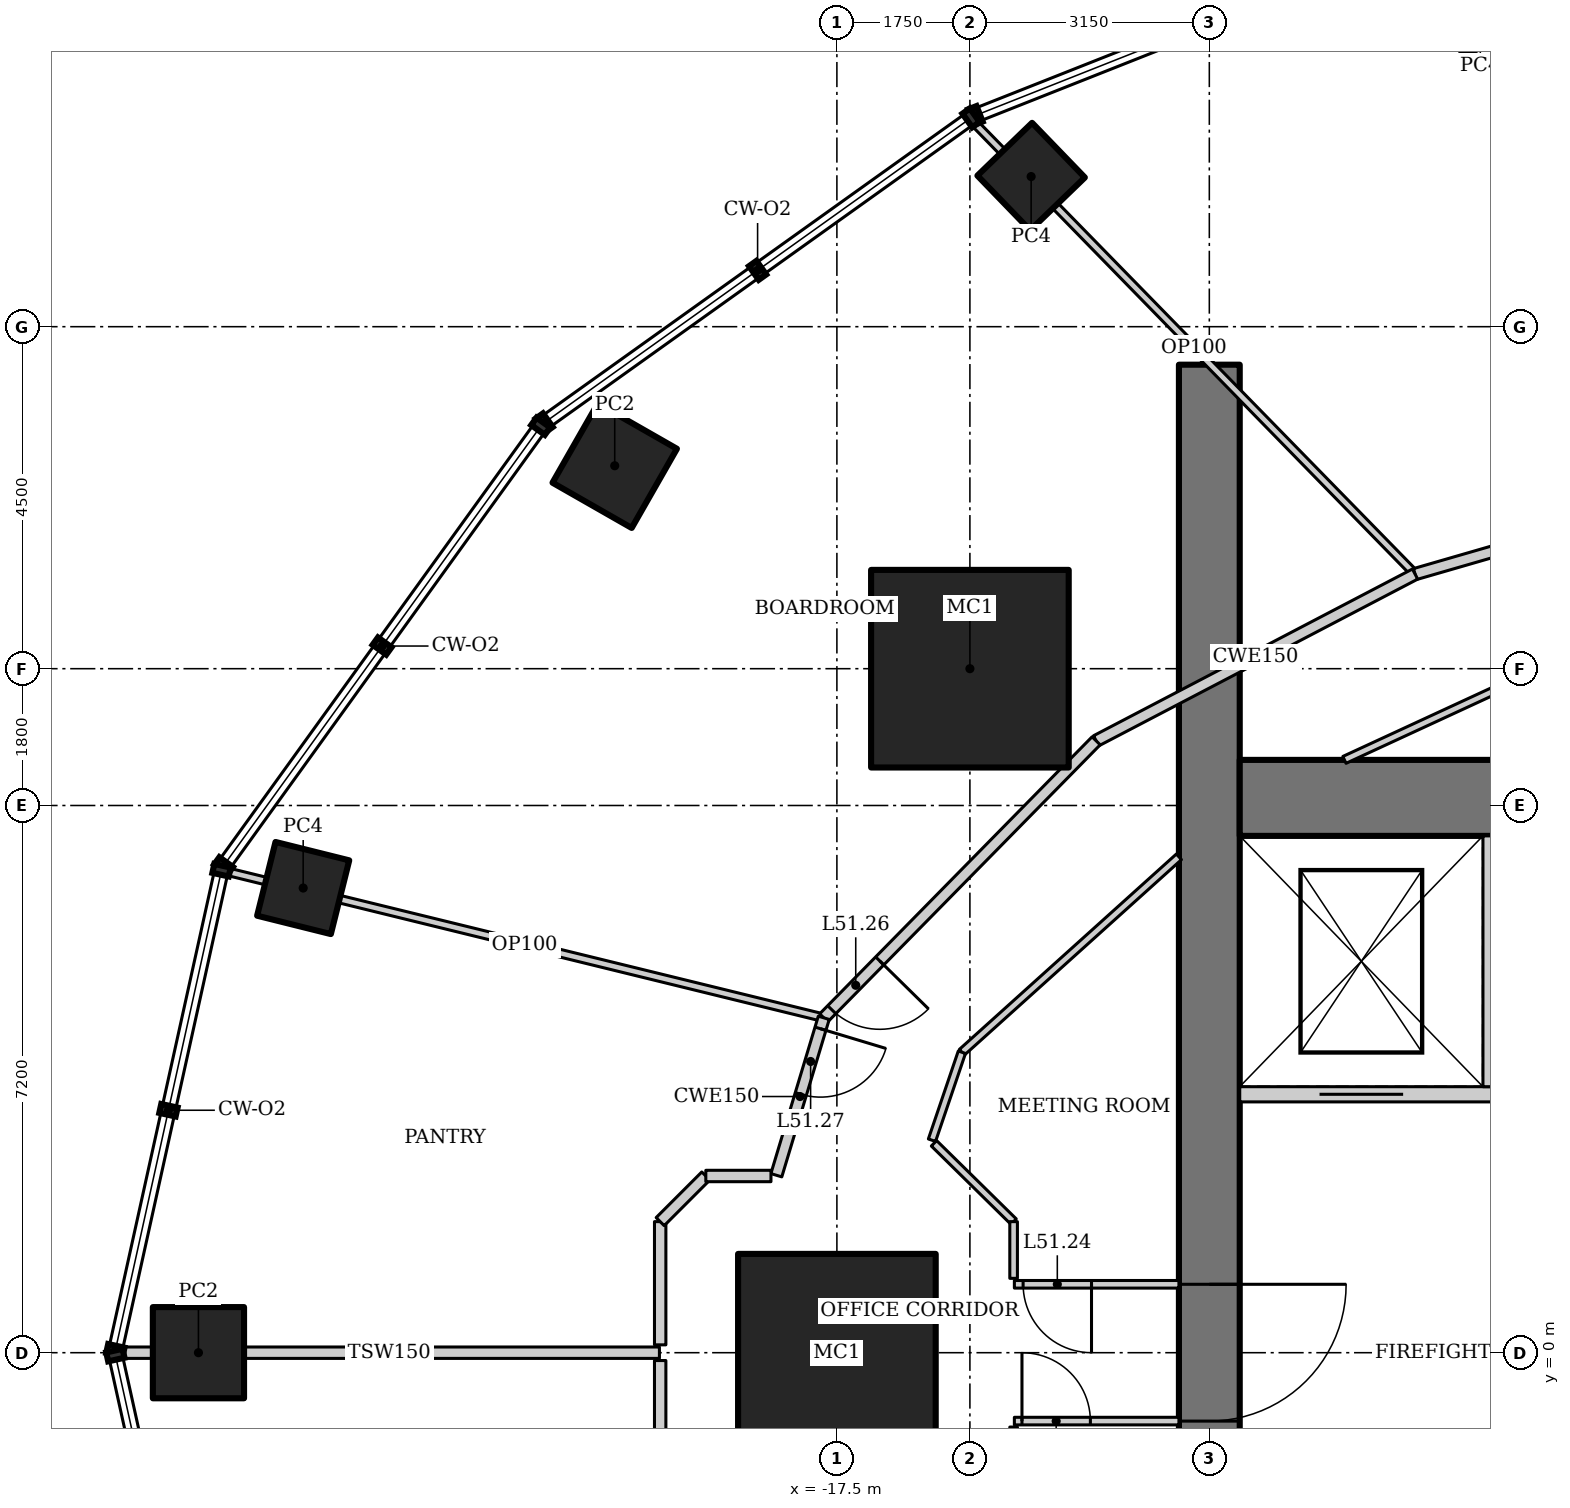
"""IFC4 building model, lengths in metres.
Left out: names, types, materials, properties, quantities, classifications, styles, units other than length and angle.
Written with IfcOpenShell. Run it as: python <this file> out.ifc"""

import sys

from ifc_helpers import new_model, si_unit, direction, frame, frame_2d, origin, origin_2d, place, context, subcontext, project, spatial, rectangle, hollow_rectangle, extrude, element, fill, save


model = new_model("IFC4")
c1 = context("Model", 3, precision=1e-05, world=origin(), true_north=direction((0.0, 1.0)))
c2 = subcontext(c1, "Body", "Model", "MODEL_VIEW")
j1 = project(units=[si_unit("LENGTHUNIT", "METRE"), si_unit("PLANEANGLEUNIT", "RADIAN")], contexts=[c1])
p1 = place(None, origin())
s1 = spatial("IfcSite", under=j1, at=p1, CompositionType="ELEMENT")
p2 = place(p1, origin())
s2 = spatial("IfcBuilding", under=s1, at=p2, CompositionType="ELEMENT")
p3 = place(p2, frame((0.0, 0.0, 220.0)))
s3 = spatial("IfcBuildingStorey", under=s2, at=p3, CompositionType="ELEMENT", Elevation=220.0)
for number, where, z_axis, x_axis in (
    (1, (-15.75, 9.0, 0.0), (0.0, 0.0, 1.0), (1.0, 0.0, 0.0)),
    (2, (-17.5, 0.0, 0.0), (0.0, 0.0, 1.0), (1.0, 0.0, 0.0)),
):
    element("IfcColumn", number, at=place(p3, frame(where, z_axis=z_axis, x_axis=x_axis)), inside=s3, PredefinedType="COLUMN", context=c2, shape_type="SweptSolid", body=[
        extrude(hollow_rectangle(XDim=2.6, YDim=2.6, WallThickness=0.13, at=origin_2d()), origin(), (0.0, 0.0, 1.0), 4.2),
    ])
for number, where, z_axis, x_axis in (
    (3, (-9.035, 17.731, 0.0), (0.0, 0.0, 1.0), (0.891, 0.454, 0.0)),
    (4, (-14.944, 15.475, 0.0), (0.0, 0.0, 1.0), (0.719, 0.695, 0.0)),
):
    element("IfcColumn", number, at=place(p3, frame(where, z_axis=z_axis, x_axis=x_axis)), inside=s3, PredefinedType="COLUMN", context=c2, shape_type="SweptSolid", body=[
        extrude(hollow_rectangle(XDim=1.0, YDim=1.0, WallThickness=0.08, at=origin_2d()), origin(), (0.0, 0.0, 1.0), 4.2),
    ])
p4 = place(p3, frame((-20.423, 11.67, 0.0), z_axis=(0.0, 0.0, 1.0), x_axis=(0.496139221777, 0.86824298017, 0.0)))
e5 = element("IfcColumn", 5, at=p4, inside=s3, PredefinedType="COLUMN", context=c2, shape_type="SweptSolid", body=[
    extrude(hollow_rectangle(XDim=1.2, YDim=1.2, WallThickness=0.1, at=origin_2d()), origin(), (0.0, 0.0, 1.0), 4.2),
])
p5 = place(p3, frame((-24.522, 6.114, 0.0), z_axis=(0.0, 0.0, 1.0), x_axis=(0.2419218956, 0.970295726276, 0.0)))
e6 = element("IfcColumn", 6, at=p5, inside=s3, PredefinedType="COLUMN", context=c2, shape_type="SweptSolid", body=[
    extrude(hollow_rectangle(XDim=1.0, YDim=1.0, WallThickness=0.08, at=origin_2d()), origin(), (0.0, 0.0, 1.0), 4.2),
])
p6 = place(p3, frame((-25.9, 0.0, 0.0), z_axis=(0.0, 0.0, 1.0), x_axis=(1.0, 0.0, 0.0)))
e7 = element("IfcColumn", 7, at=p6, inside=s3, PredefinedType="COLUMN", context=c2, shape_type="SweptSolid", body=[
    extrude(hollow_rectangle(XDim=1.2, YDim=1.2, WallThickness=0.1, at=origin_2d()), origin(), (0.0, 0.0, 1.0), 4.2),
])
p7 = place(p3, frame((-12.6, 13.0, 0.0), z_axis=(0.0, 0.0, 1.0), x_axis=(0.0, -1.0, 0.0)))
e8 = element("IfcWall", 8, at=p7, inside=s3, PredefinedType="SHEAR", context=c2, shape_type="SweptSolid", body=[
    extrude(rectangle(XDim=26.0, YDim=0.8, at=frame_2d((13.0, 0.0))), origin(), (0.0, 0.0, 1.0), 4.2),
])
p8 = place(p7, frame((12.1, 0.0, 0.0)))
e9 = element("IfcOpeningElement", 9, at=p8, cuts=e8, PredefinedType="OPENING", context=c2, shape_type="SweptSolid", body=[
    extrude(rectangle(XDim=1.8, YDim=2.1, at=frame_2d((0.9, 1.05))), frame((0.0, 0.41, 0.0), z_axis=(0.0, -1.0, 0.0), x_axis=(1.0, 0.0, 0.0)), (0.0, 0.0, 1.0), 0.82),
])
p9 = place(p3, frame((-5.6, 7.3, 0.0), z_axis=(0.0, 0.0, 1.0), x_axis=(-1.0, 0.0, 0.0)))
e10 = element("IfcWall", 10, at=p9, inside=s3, PredefinedType="SHEAR", context=c2, shape_type="SweptSolid", body=[
    extrude(rectangle(XDim=6.6, YDim=1.0, at=frame_2d((3.3, 0.0))), origin(), (0.0, 0.0, 1.0), 4.2),
])
p10 = place(p3, frame((-12.2, 3.4, 0.0), z_axis=(0.0, 0.0, 1.0), x_axis=(1.0, 0.0, 0.0)))
e11 = element("IfcWall", 11, at=p10, inside=s3, PredefinedType="SOLIDWALL", context=c2, shape_type="SweptSolid", body=[
    extrude(rectangle(XDim=6.6, YDim=0.2, at=frame_2d((3.3, 0.0))), origin(), (0.0, 0.0, 1.0), 4.2),
])
p11 = place(p10, frame((1.05, 0.0, 0.0)))
e12 = element("IfcOpeningElement", 12, at=p11, cuts=e11, PredefinedType="OPENING", context=c2, shape_type="SweptSolid", body=[
    extrude(rectangle(XDim=1.1, YDim=2.2, at=frame_2d((0.55, 1.1))), frame((0.0, 0.11, 0.0), z_axis=(0.0, -1.0, 0.0), x_axis=(1.0, 0.0, 0.0)), (0.0, 0.0, 1.0), 0.22),
])
p12 = place(p10, frame((4.3, 0.0, 0.0)))
e13 = element("IfcOpeningElement", 13, at=p12, cuts=e11, PredefinedType="OPENING", context=c2, shape_type="SweptSolid", body=[
    extrude(rectangle(XDim=1.4, YDim=2.2, at=frame_2d((0.7, 1.1))), frame((0.0, 0.11, 0.0), z_axis=(0.0, -1.0, 0.0), x_axis=(1.0, 0.0, 0.0)), (0.0, 0.0, 1.0), 0.22),
])
p13 = place(p3, frame((-8.9, 3.5, 0.0), z_axis=(0.0, 0.0, 1.0), x_axis=(0.0, 1.0, 0.0)))
e14 = element("IfcWall", 14, at=p13, inside=s3, PredefinedType="SOLIDWALL", context=c2, shape_type="SweptSolid", body=[
    extrude(rectangle(XDim=3.3, YDim=0.2, at=frame_2d((1.65, 0.0))), origin(), (0.0, 0.0, 1.0), 4.2),
])
p14 = place(p3, frame((-15.709, 16.199, 0.0), z_axis=(0.0, 0.0, 1.0), x_axis=(0.69875697861, -0.715359129978, 0.0)))
e15 = element("IfcWall", 15, at=p14, inside=s3, PredefinedType="PARTITIONING", context=c2, shape_type="SweptSolid", body=[
    extrude(rectangle(XDim=8.323, YDim=0.1, at=frame_2d((4.162, 0.0))), origin(), (0.0, 0.0, 1.0), 3.41),
])
p15 = place(p3, frame((-25.543, 6.336, 0.0), z_axis=(0.0, 0.0, 1.0), x_axis=(0.97123661777, -0.238116425942, 0.0)))
e16 = element("IfcWall", 16, at=p15, inside=s3, PredefinedType="PARTITIONING", context=c2, shape_type="SweptSolid", body=[
    extrude(rectangle(XDim=8.103, YDim=0.1, at=frame_2d((4.052, 0.0))), origin(), (0.0, 0.0, 1.0), 3.108),
])
p16 = place(p3, frame((-5.82, 11.423, 0.0), z_axis=(0.0, 0.0, 1.0), x_axis=(-0.960614838378, -0.27788330696, 0.0)))
e17 = element("IfcWall", 17, at=p16, inside=s3, PredefinedType="PARTITIONING", context=c2, shape_type="SweptSolid", body=[
    extrude(rectangle(XDim=4.24, YDim=0.15, at=frame_2d((2.12, 0.0))), origin(), (0.0, 0.0, 1.0), 4.05),
])
p17 = place(p3, frame((-9.893, 10.245, 0.0), z_axis=(0.0, 0.0, 1.0), x_axis=(-0.886174439647, -0.463351769735, 0.0)))
e18 = element("IfcWall", 18, at=p17, inside=s3, PredefinedType="PARTITIONING", context=c2, shape_type="SweptSolid", body=[
    extrude(rectangle(XDim=4.735, YDim=0.15, at=frame_2d((2.367, 0.0))), origin(), (0.0, 0.0, 1.0), 4.05),
])
p18 = place(p3, frame((-14.089, 8.051, 0.0), z_axis=(0.0, 0.0, 1.0), x_axis=(-0.701111216625, -0.713051934941, 0.0)))
e19 = element("IfcWall", 19, at=p18, inside=s3, PredefinedType="PARTITIONING", context=c2, shape_type="SweptSolid", body=[
    extrude(rectangle(XDim=5.112, YDim=0.15, at=frame_2d((2.556, 0.0))), origin(), (0.0, 0.0, 1.0), 4.05),
])
p19 = place(p18, frame((4.061, 0.0, 0.0)))
e20 = element("IfcOpeningElement", 20, at=p19, cuts=e19, PredefinedType="OPENING", context=c2, shape_type="SweptSolid", body=[
    extrude(rectangle(XDim=0.9, YDim=2.1, at=frame_2d((0.45, 1.05))), frame((0.0, 0.085, 0.0), z_axis=(0.0, -1.0, 0.0), x_axis=(1.0, 0.0, 0.0)), (0.0, 0.0, 1.0), 0.17),
])
p20 = place(p3, frame((-10.823, 7.8, 0.0), z_axis=(0.0, 0.0, 1.0), x_axis=(0.907759689292, 0.419490579748, 0.0)))
e21 = element("IfcWall", 21, at=p20, inside=s3, PredefinedType="PARTITIONING", context=c2, shape_type="SweptSolid", body=[
    extrude(rectangle(XDim=2.506, YDim=0.1, at=frame_2d((1.253, 0.0))), origin(), (0.0, 0.0, 1.0), 4.05),
])
p21 = place(p3, frame((-15.856, 3.953, 0.0), z_axis=(0.0, 0.0, 1.0), x_axis=(0.743177243228, 0.669094601046, 0.0)))
e22 = element("IfcWall", 22, at=p21, inside=s3, PredefinedType="PARTITIONING", context=c2, shape_type="SweptSolid", body=[
    extrude(rectangle(XDim=3.843, YDim=0.1, at=frame_2d((1.921, 0.0))), origin(), (0.0, 0.0, 1.0), 4.05),
])
p22 = place(p3, frame((-26.944, 0.0, 0.0), z_axis=(0.0, 0.0, 1.0), x_axis=(1.0, 0.0, 0.0)))
e23 = element("IfcWall", 23, at=p22, inside=s3, PredefinedType="PARTITIONING", context=c2, shape_type="SweptSolid", body=[
    extrude(rectangle(XDim=7.109, YDim=0.15, at=frame_2d((3.555, 0.0))), origin(), (0.0, 0.0, 1.0), 3.349),
])
p23 = place(p3, frame((-17.673, 4.406, 0.0), z_axis=(0.0, 0.0, 1.0), x_axis=(-0.288362447016, -0.957521330912, 0.0)))
e24 = element("IfcWall", 24, at=p23, inside=s3, PredefinedType="PARTITIONING", context=c2, shape_type="SweptSolid", body=[
    extrude(rectangle(XDim=2.163, YDim=0.15, at=frame_2d((1.082, 0.0))), origin(), (0.0, 0.0, 1.0), 4.05),
])
p24 = place(p23, frame((0.15, 0.0, 0.0)))
e25 = element("IfcOpeningElement", 25, at=p24, cuts=e24, PredefinedType="OPENING", context=c2, shape_type="SweptSolid", body=[
    extrude(rectangle(XDim=0.9, YDim=2.1, at=frame_2d((0.45, 1.05))), frame((0.0, 0.085, 0.0), z_axis=(0.0, -1.0, 0.0), x_axis=(1.0, 0.0, 0.0)), (0.0, 0.0, 1.0), 0.17),
])
p25 = place(p3, frame((-15.165, -0.9, 0.0), z_axis=(0.0, 0.0, 1.0), x_axis=(1.0, 0.0, 0.0)))
e26 = element("IfcWall", 26, at=p25, inside=s3, PredefinedType="PARTITIONING", context=c2, shape_type="SweptSolid", body=[
    extrude(rectangle(XDim=2.165, YDim=0.1, at=frame_2d((1.083, 0.0))), origin(), (0.0, 0.0, 1.0), 4.05),
])
p26 = place(p25, frame((0.1, 0.0, 0.0)))
e27 = element("IfcOpeningElement", 27, at=p26, cuts=e26, PredefinedType="OPENING", context=c2, shape_type="SweptSolid", body=[
    extrude(rectangle(XDim=0.9, YDim=2.1, at=frame_2d((0.45, 1.05))), frame((0.0, 0.06, 0.0), z_axis=(0.0, -1.0, 0.0), x_axis=(1.0, 0.0, 0.0)), (0.0, 0.0, 1.0), 0.12),
])
p27 = place(p3, frame((-13.0, 0.9, 0.0), z_axis=(0.0, 0.0, 1.0), x_axis=(-1.0, 0.0, 0.0)))
e28 = element("IfcWall", 28, at=p27, inside=s3, PredefinedType="PARTITIONING", context=c2, shape_type="SweptSolid", body=[
    extrude(rectangle(XDim=2.165, YDim=0.1, at=frame_2d((1.083, 0.0))), origin(), (0.0, 0.0, 1.0), 4.05),
])
p28 = place(p27, frame((1.15, 0.0, 0.0)))
e29 = element("IfcOpeningElement", 29, at=p28, cuts=e28, PredefinedType="OPENING", context=c2, shape_type="SweptSolid", body=[
    extrude(rectangle(XDim=0.9, YDim=2.1, at=frame_2d((0.45, 1.05))), frame((0.0, 0.06, 0.0), z_axis=(0.0, -1.0, 0.0), x_axis=(1.0, 0.0, 0.0)), (0.0, 0.0, 1.0), 0.12),
])
p29 = place(p3, frame((-16.249, 2.796, 0.0), z_axis=(0.0, 0.0, 1.0), x_axis=(0.321913473529, 0.946769093053, 0.0)))
e30 = element("IfcWall", 30, at=p29, inside=s3, PredefinedType="PARTITIONING", context=c2, shape_type="SweptSolid", body=[
    extrude(rectangle(XDim=1.223, YDim=0.1, at=frame_2d((0.611, 0.0))), origin(), (0.0, 0.0, 1.0), 4.05),
])
p30 = place(p3, frame((-15.175, -0.978, 0.0), z_axis=(0.0, 0.0, 1.0), x_axis=(0.0, -1.0, 0.0)))
e31 = element("IfcWall", 31, at=p30, inside=s3, PredefinedType="PARTITIONING", context=c2, shape_type="SweptSolid", body=[
    extrude(rectangle(XDim=0.746, YDim=0.1, at=frame_2d((0.373, 0.0))), origin(), (0.0, 0.0, 1.0), 4.05),
])
p31 = place(p3, frame((-16.223, 2.755, 0.0), z_axis=(0.0, 0.0, 1.0), x_axis=(0.712897698193, -0.701268045694, 0.0)))
e32 = element("IfcWall", 32, at=p31, inside=s3, PredefinedType="PARTITIONING", context=c2, shape_type="SweptSolid", body=[
    extrude(rectangle(XDim=1.469, YDim=0.1, at=frame_2d((0.735, 0.0))), origin(), (0.0, 0.0, 1.0), 4.05),
])
p32 = place(p3, frame((-15.175, 1.725, 0.0), z_axis=(0.0, 0.0, 1.0), x_axis=(0.0, -1.0, 0.0)))
e33 = element("IfcWall", 33, at=p32, inside=s3, PredefinedType="PARTITIONING", context=c2, shape_type="SweptSolid", body=[
    extrude(rectangle(XDim=0.746, YDim=0.1, at=frame_2d((0.373, 0.0))), origin(), (0.0, 0.0, 1.0), 4.05),
])
p33 = place(p3, frame((-19.825, 0.103, 0.0), z_axis=(0.0, 0.0, 1.0), x_axis=(0.0, 1.0, 0.0)))
e34 = element("IfcWall", 34, at=p33, inside=s3, PredefinedType="PARTITIONING", context=c2, shape_type="SweptSolid", body=[
    extrude(rectangle(XDim=1.621, YDim=0.15, at=frame_2d((0.811, 0.0))), origin(), (0.0, 0.0, 1.0), 4.05),
])
p34 = place(p3, frame((-19.825, 1.725, 0.0), z_axis=(0.0, 0.0, 1.0), x_axis=(0.707106781187, 0.707106781187, 0.0)))
e35 = element("IfcWall", 35, at=p34, inside=s3, PredefinedType="PARTITIONING", context=c2, shape_type="SweptSolid", body=[
    extrude(rectangle(XDim=0.849, YDim=0.15, at=frame_2d((0.425, 0.0))), origin(), (0.0, 0.0, 1.0), 4.05),
])
p35 = place(p3, frame((-19.225, 2.325, 0.0), z_axis=(0.0, 0.0, 1.0), x_axis=(1.0, 0.0, 0.0)))
e36 = element("IfcWall", 36, at=p35, inside=s3, PredefinedType="PARTITIONING", context=c2, shape_type="SweptSolid", body=[
    extrude(rectangle(XDim=0.857, YDim=0.15, at=frame_2d((0.429, 0.0))), origin(), (0.0, 0.0, 1.0), 4.05),
])
p36 = place(p3, frame((-19.825, -1.725, 0.0), z_axis=(0.0, 0.0, 1.0), x_axis=(0.0, 1.0, 0.0)))
e37 = element("IfcWall", 37, at=p36, inside=s3, PredefinedType="PARTITIONING", context=c2, shape_type="SweptSolid", body=[
    extrude(rectangle(XDim=1.621, YDim=0.15, at=frame_2d((0.811, 0.0))), origin(), (0.0, 0.0, 1.0), 4.05),
])
p37 = place(p8, origin())
e38 = element("IfcDoor", 38, at=p37, inside=s3, OperationType="DOUBLE_DOOR_DOUBLE_SWING", PredefinedType="DOOR", context=c2, shape_type="SweptSolid", body=[
    extrude(rectangle(XDim=1.8, YDim=2.1, at=frame_2d((0.9, 1.05))), frame((0.0, 0.025, 0.0), z_axis=(0.0, -1.0, 0.0), x_axis=(1.0, 0.0, 0.0)), (0.0, 0.0, 1.0), 0.05),
])
fill(e9, e38)
p38 = place(p11, origin())
e39 = element("IfcDoor", 39, at=p38, inside=s3, OperationType="DOUBLE_DOOR_SLIDING", PredefinedType="DOOR", context=c2, shape_type="SweptSolid", body=[
    extrude(rectangle(XDim=1.1, YDim=2.2, at=frame_2d((0.55, 1.1))), frame((0.0, 0.025, 0.0), z_axis=(0.0, -1.0, 0.0), x_axis=(1.0, 0.0, 0.0)), (0.0, 0.0, 1.0), 0.05),
])
fill(e12, e39)
p39 = place(p26, origin())
e40 = element("IfcDoor", 40, at=p39, inside=s3, OperationType="SINGLE_SWING_LEFT", PredefinedType="DOOR", context=c2, shape_type="SweptSolid", body=[
    extrude(rectangle(XDim=0.9, YDim=2.1, at=frame_2d((0.45, 1.05))), frame((0.0, 0.025, 0.0), z_axis=(0.0, -1.0, 0.0), x_axis=(1.0, 0.0, 0.0)), (0.0, 0.0, 1.0), 0.05),
])
fill(e27, e40)
p40 = place(p28, origin())
e41 = element("IfcDoor", 41, at=p40, inside=s3, OperationType="SINGLE_SWING_LEFT", PredefinedType="DOOR", context=c2, shape_type="SweptSolid", body=[
    extrude(rectangle(XDim=0.9, YDim=2.1, at=frame_2d((0.45, 1.05))), frame((0.0, 0.025, 0.0), z_axis=(0.0, -1.0, 0.0), x_axis=(1.0, 0.0, 0.0)), (0.0, 0.0, 1.0), 0.05),
])
fill(e29, e41)
p41 = place(p19, origin())
e42 = element("IfcDoor", 42, at=p41, inside=s3, OperationType="SINGLE_SWING_LEFT", PredefinedType="DOOR", context=c2, shape_type="SweptSolid", body=[
    extrude(rectangle(XDim=0.9, YDim=2.1, at=frame_2d((0.45, 1.05))), frame((0.0, 0.025, 0.0), z_axis=(0.0, -1.0, 0.0), x_axis=(1.0, 0.0, 0.0)), (0.0, 0.0, 1.0), 0.05),
])
fill(e20, e42)
p42 = place(p24, origin())
e43 = element("IfcDoor", 43, at=p42, inside=s3, OperationType="SINGLE_SWING_LEFT", PredefinedType="DOOR", context=c2, shape_type="SweptSolid", body=[
    extrude(rectangle(XDim=0.9, YDim=2.1, at=frame_2d((0.45, 1.05))), frame((0.0, 0.025, 0.0), z_axis=(0.0, -1.0, 0.0), x_axis=(1.0, 0.0, 0.0)), (0.0, 0.0, 1.0), 0.05),
])
fill(e25, e43)
save(model, sys.argv[1])
